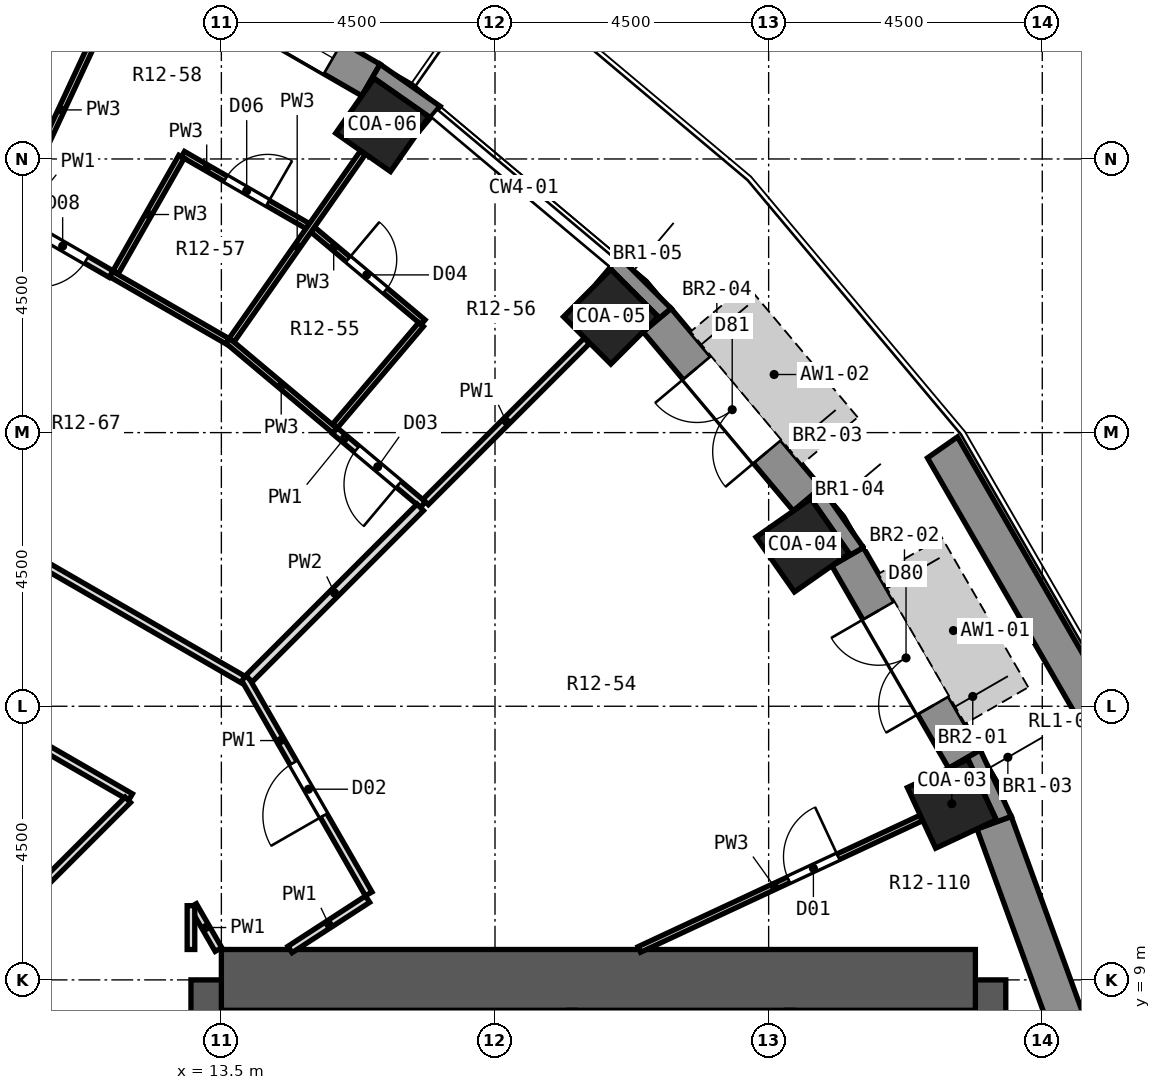
"""IFC4 building model, lengths in metres.
Left out: names, types, materials, properties, quantities, classifications, styles, units other than length and angle.
Written with IfcOpenShell. Run it as: python <this file> out.ifc"""

import sys

from ifc_helpers import new_model, si_unit, direction, frame, frame_2d, origin, origin_2d, place, context, subcontext, project, spatial, polyline, rectangle, outline, extrude, element, fill, save


model = new_model("IFC4")
c1 = context("Model", 3, precision=1e-05, world=origin(), true_north=direction((0.0, 1.0)))
c2 = subcontext(c1, "Body", "Model", "MODEL_VIEW")
j1 = project(units=[si_unit("LENGTHUNIT", "METRE"), si_unit("PLANEANGLEUNIT", "RADIAN")], contexts=[c1])
p1 = place(None, origin())
s1 = spatial("IfcSite", under=j1, at=p1, CompositionType="ELEMENT")
p2 = place(p1, origin())
s2 = spatial("IfcBuilding", under=s1, at=p2, CompositionType="ELEMENT")
p3 = place(p2, frame((0.0, 0.0, 56.0)))
s3 = spatial("IfcBuildingStorey", under=s2, at=p3, CompositionType="ELEMENT", Elevation=56.0)
for number, where, z_axis, x_axis in (
    (1, (25.512, 11.897, 0.0), (0.0, 0.0, 1.0), (0.906, 0.423, 0.0)),
    (2, (23.059, 16.146, 0.0), (0.0, 0.0, 1.0), (0.819, 0.574, 0.0)),
    (3, (19.905, 19.905, 0.0), (0.0, 0.0, 1.0), (0.707, 0.707, 0.0)),
    (4, (16.146, 23.059, 0.0), (0.0, 0.0, 1.0), (0.574, 0.819, 0.0)),
):
    element("IfcColumn", number, at=place(p3, frame(where, z_axis=z_axis, x_axis=x_axis)), inside=s3, PredefinedType="COLUMN", context=c2, shape_type="SweptSolid", body=[
        extrude(rectangle(XDim=1.1, YDim=1.1, at=origin_2d()), origin(), (0.0, 0.0, 1.0), 3.3),
    ])
p4 = place(p3, frame((13.5, -9.0, 0.0), z_axis=(0.0, 0.0, 1.0), x_axis=(0.0, 1.0, 0.0)))
e5 = element("IfcWall", 5, at=p4, inside=s3, PredefinedType="SHEAR", context=c2, shape_type="SweptSolid", body=[
    extrude(rectangle(XDim=18.0, YDim=1.0, at=frame_2d((9.0, 0.0))), origin(), (0.0, 0.0, 1.0), 3.3),
])
p5 = place(p4, frame((15.4, 0.0, 0.0)))
e6 = element("IfcOpeningElement", 6, at=p5, cuts=e5, PredefinedType="OPENING", context=c2, shape_type="SweptSolid", body=[
    extrude(rectangle(XDim=1.2, YDim=2.1, at=frame_2d((0.6, 1.05))), frame((0.0, 0.512, 0.0), z_axis=(0.0, -1.0, 0.0), x_axis=(1.0, 0.0, 0.0)), (0.0, 0.0, 1.0), 1.024),
])
p6 = place(p4, frame((1.4, 0.0, 0.0)))
e7 = element("IfcOpeningElement", 7, at=p6, cuts=e5, PredefinedType="OPENING", context=c2, shape_type="SweptSolid", body=[
    extrude(rectangle(XDim=1.2, YDim=2.1, at=frame_2d((0.6, 1.05))), frame((0.0, 0.512, 0.0), z_axis=(0.0, -1.0, 0.0), x_axis=(1.0, 0.0, 0.0)), (0.0, 0.0, 1.0), 1.024),
])
p7 = place(p4, frame((7.5, 0.0, 0.0)))
e8 = element("IfcOpeningElement", 8, at=p7, cuts=e5, PredefinedType="OPENING", context=c2, shape_type="SweptSolid", body=[
    extrude(rectangle(XDim=3.0, YDim=2.4, at=frame_2d((1.5, 1.2))), frame((0.0, 0.512, 0.0), z_axis=(0.0, -1.0, 0.0), x_axis=(1.0, 0.0, 0.0)), (0.0, 0.0, 1.0), 1.024),
])
p8 = place(p3, frame((25.9, -9.0, 0.0), z_axis=(0.0, 0.0, 1.0), x_axis=(0.0, 1.0, 0.0)))
e9 = element("IfcWall", 9, at=p8, inside=s3, PredefinedType="SHEAR", context=c2, shape_type="SweptSolid", body=[
    extrude(rectangle(XDim=18.0, YDim=1.0, at=frame_2d((9.0, 0.0))), origin(), (0.0, 0.0, 1.0), 3.3),
])
p9 = place(p3, frame((13.5, 9.0, 0.0), z_axis=(0.0, 0.0, 1.0), x_axis=(1.0, 0.0, 0.0)))
e10 = element("IfcWall", 10, at=p9, inside=s3, PredefinedType="SHEAR", context=c2, shape_type="SweptSolid", body=[
    extrude(rectangle(XDim=12.4, YDim=1.0, at=frame_2d((6.2, 0.0))), origin(), (0.0, 0.0, 1.0), 3.3),
])
p10 = place(p3, frame((27.523, 7.971, 0.0), z_axis=(0.0, 0.0, 1.0), x_axis=(-0.342028474173, 0.939689588564, 0.0)))
e11 = element("IfcWall", 11, at=p10, inside=s3, PredefinedType="SOLIDWALL", context=c2, shape_type="SweptSolid", body=[
    extrude(rectangle(XDim=3.846, YDim=0.6, at=frame_2d((1.923, 0.0))), origin(), (0.0, 0.0, 1.0), 2.75),
])
p11 = place(p3, frame((25.721, 12.63, 0.0), z_axis=(0.0, 0.0, 1.0), x_axis=(-0.499989888488, 0.86603124159, 0.0)))
e12 = element("IfcWall", 12, at=p11, inside=s3, PredefinedType="SOLIDWALL", context=c2, shape_type="SweptSolid", body=[
    extrude(rectangle(XDim=3.846, YDim=0.6, at=frame_2d((1.923, 0.0))), origin(), (0.0, 0.0, 1.0), 2.75),
])
p12 = place(p11, frame((1.023, 0.0, 0.0)))
e13 = element("IfcOpeningElement", 13, at=p12, cuts=e12, PredefinedType="OPENING", context=c2, shape_type="SweptSolid", body=[
    extrude(rectangle(XDim=1.8, YDim=2.4, at=frame_2d((0.9, 1.2))), frame((0.0, 0.312, 0.0), z_axis=(0.0, -1.0, 0.0), x_axis=(1.0, 0.0, 0.0)), (0.0, 0.0, 1.0), 0.624),
])
p13 = place(p3, frame((23.137, 16.904, 0.0), z_axis=(0.0, 0.0, 1.0), x_axis=(-0.642809392687, 0.766026164483, 0.0)))
e14 = element("IfcWall", 14, at=p13, inside=s3, PredefinedType="SOLIDWALL", context=c2, shape_type="SweptSolid", body=[
    extrude(rectangle(XDim=3.846, YDim=0.6, at=frame_2d((1.923, 0.0))), origin(), (0.0, 0.0, 1.0), 2.75),
])
p14 = place(p13, frame((1.023, 0.0, 0.0)))
e15 = element("IfcOpeningElement", 15, at=p14, cuts=e14, PredefinedType="OPENING", context=c2, shape_type="SweptSolid", body=[
    extrude(rectangle(XDim=1.8, YDim=2.4, at=frame_2d((0.9, 1.2))), frame((0.0, 0.312, 0.0), z_axis=(0.0, -1.0, 0.0), x_axis=(1.0, 0.0, 0.0)), (0.0, 0.0, 1.0), 0.624),
])
p15 = place(p3, frame((15.96, 23.798, 0.0), z_axis=(0.0, 0.0, 1.0), x_axis=(-0.86603124159, 0.499989888488, 0.0)))
e16 = element("IfcWall", 16, at=p15, inside=s3, PredefinedType="SOLIDWALL", context=c2, shape_type="SweptSolid", body=[
    extrude(rectangle(XDim=3.846, YDim=0.6, at=frame_2d((1.923, 0.0))), origin(), (0.0, 0.0, 1.0), 2.75),
])
p16 = place(p15, frame((0.723, 0.0, 0.9)))
e17 = element("IfcOpeningElement", 17, at=p16, cuts=e16, PredefinedType="OPENING", context=c2, shape_type="SweptSolid", body=[
    extrude(rectangle(XDim=2.4, YDim=1.8, at=frame_2d((1.2, 0.9))), frame((0.0, 0.312, 0.0), z_axis=(0.0, -1.0, 0.0), x_axis=(1.0, 0.0, 0.0)), (0.0, 0.0, 1.0), 0.624),
])
p17 = place(p3, origin())
e18 = element("IfcWall", 18, at=p17, inside=s3, PredefinedType="SOLIDWALL", context=c2, shape_type="SweptSolid", body=[
    extrude(outline(polyline([(25.981, 12.78), (25.461, 12.479), (25.779, 12.628), (26.243, 11.631), (25.926, 11.483), (26.49, 11.688), (25.981, 12.78)])), origin(), (0.0, 0.0, 1.0), 2.75),
])
p18 = place(p3, origin())
e19 = element("IfcWall", 19, at=p18, inside=s3, PredefinedType="SOLIDWALL", context=c2, shape_type="SweptSolid", body=[
    extrude(outline(polyline([(24.058, 16.11), (23.367, 17.097), (22.907, 16.711), (23.194, 16.912), (23.825, 16.011), (23.538, 15.81), (24.058, 16.11)])), origin(), (0.0, 0.0, 1.0), 2.75),
])
p19 = place(p3, origin())
e20 = element("IfcWall", 20, at=p19, inside=s3, PredefinedType="SOLIDWALL", context=c2, shape_type="SweptSolid", body=[
    extrude(outline(polyline([(20.043, 20.895), (19.657, 20.435), (19.905, 20.683), (20.683, 19.905), (20.435, 19.657), (20.895, 20.043), (20.043, 20.895)])), origin(), (0.0, 0.0, 1.0), 2.75),
])
p20 = place(p3, origin())
e21 = element("IfcWall", 21, at=p20, inside=s3, PredefinedType="SOLIDWALL", context=c2, shape_type="SweptSolid", body=[
    extrude(outline(polyline([(17.097, 23.367), (16.11, 24.058), (15.81, 23.538), (16.011, 23.825), (16.912, 23.194), (16.711, 22.907), (17.097, 23.367)])), origin(), (0.0, 0.0, 1.0), 2.75),
])
p21 = place(p3, origin())
e22 = element("IfcWall", 22, at=p21, inside=s3, PredefinedType="PARAPET", context=c2, shape_type="SweptSolid", body=[
    extrude(outline(polyline([(30.194, 8.09), (28.33, 13.21), (25.605, 17.929), (25.112, 17.584), (27.784, 12.956), (29.612, 7.934), (30.194, 8.09)])), origin(), (0.0, 0.0, 1.0), 0.5),
])
p22 = place(p3, frame((13.876, 13.976, 0.0), z_axis=(0.0, 0.0, 1.0), x_axis=(0.498306982451, -0.867000663921, 0.0)))
e23 = element("IfcWall", 23, at=p22, inside=s3, PredefinedType="PARTITIONING", context=c2, shape_type="SweptSolid", body=[
    extrude(rectangle(XDim=4.108, YDim=0.125, at=frame_2d((2.054, 0.0))), origin(), (0.0, 0.0, 1.0), 2.75),
])
p23 = place(p22, frame((1.623, 0.0, 0.0)))
e24 = element("IfcOpeningElement", 24, at=p23, cuts=e23, PredefinedType="OPENING", context=c2, shape_type="SweptSolid", body=[
    extrude(rectangle(XDim=1.0, YDim=2.1, at=frame_2d((0.5, 1.05))), frame((0.0, 0.074, 0.0), z_axis=(0.0, -1.0, 0.0), x_axis=(1.0, 0.0, 0.0)), (0.0, 0.0, 1.0), 0.149),
])
p24 = place(p3, frame((13.035, 10.222, 0.0), z_axis=(0.0, 0.0, 1.0), x_axis=(0.49991670217, -0.866073490468, 0.0)))
e25 = element("IfcWall", 25, at=p24, inside=s3, PredefinedType="PARTITIONING", context=c2, shape_type="SweptSolid", body=[
    extrude(rectangle(XDim=0.834, YDim=0.125, at=frame_2d((0.417, 0.0))), origin(), (0.0, 0.0, 1.0), 2.75),
])
p25 = place(p3, frame((13.601, 19.513, 0.0), z_axis=(0.0, 0.0, 1.0), x_axis=(0.765838323525, -0.643033173499, 0.0)))
e26 = element("IfcWall", 26, at=p25, inside=s3, PredefinedType="PARTITIONING", context=c2, shape_type="SweptSolid", body=[
    extrude(rectangle(XDim=2.306, YDim=0.1, at=frame_2d((1.153, 0.0))), origin(), (0.0, 0.0, 1.0), 2.75),
])
p26 = place(p3, frame((15.367, 18.03, 0.0), z_axis=(0.0, 0.0, 1.0), x_axis=(0.766035589551, -0.64279816081, 0.0)))
e27 = element("IfcWall", 27, at=p26, inside=s3, PredefinedType="PARTITIONING", context=c2, shape_type="SweptSolid", body=[
    extrude(rectangle(XDim=1.89, YDim=0.125, at=frame_2d((0.945, 0.0))), origin(), (0.0, 0.0, 1.0), 2.75),
])
p27 = place(p26, frame((0.47, 0.0, 0.0)))
e28 = element("IfcOpeningElement", 28, at=p27, cuts=e27, PredefinedType="OPENING", context=c2, shape_type="SweptSolid", body=[
    extrude(rectangle(XDim=0.9, YDim=2.1, at=frame_2d((0.45, 1.05))), frame((0.0, 0.074, 0.0), z_axis=(0.0, -1.0, 0.0), x_axis=(1.0, 0.0, 0.0)), (0.0, 0.0, 1.0), 0.149),
])
p28 = place(p3, frame((15.002, 21.339, 0.0), z_axis=(0.0, 0.0, 1.0), x_axis=(0.765995095449, -0.642846415365, 0.0)))
e29 = element("IfcWall", 29, at=p28, inside=s3, PredefinedType="PARTITIONING", context=c2, shape_type="SweptSolid", body=[
    extrude(rectangle(XDim=2.369, YDim=0.1, at=frame_2d((1.185, 0.0))), origin(), (0.0, 0.0, 1.0), 2.75),
])
p29 = place(p28, frame((0.76, 0.0, 0.0)))
e30 = element("IfcOpeningElement", 30, at=p29, cuts=e29, PredefinedType="OPENING", context=c2, shape_type="SweptSolid", body=[
    extrude(rectangle(XDim=0.8, YDim=2.1, at=frame_2d((0.4, 1.05))), frame((0.0, 0.062, 0.0), z_axis=(0.0, -1.0, 0.0), x_axis=(1.0, 0.0, 0.0)), (0.0, 0.0, 1.0), 0.124),
])
p30 = place(p3, frame((4.332, 16.436, 0.0), z_axis=(0.0, 0.0, 1.0), x_axis=(0.866073188118, -0.499917225971, 0.0)))
e31 = element("IfcWall", 31, at=p30, inside=s3, PredefinedType="PARTITIONING", context=c2, shape_type="SweptSolid", body=[
    extrude(rectangle(XDim=8.861, YDim=0.125, at=frame_2d((4.431, 0.0))), origin(), (0.0, 0.0, 1.0), 2.75),
])
p31 = place(p30, frame((4.768, 0.0, 0.0)))
e32 = element("IfcOpeningElement", 32, at=p31, cuts=e31, PredefinedType="OPENING", context=c2, shape_type="SweptSolid", body=[
    extrude(rectangle(XDim=0.9, YDim=2.1, at=frame_2d((0.45, 1.05))), frame((0.0, 0.074, 0.0), z_axis=(0.0, -1.0, 0.0), x_axis=(1.0, 0.0, 0.0)), (0.0, 0.0, 1.0), 0.149),
])
p32 = place(p3, frame((5.029, 19.036, 0.0), z_axis=(0.0, 0.0, 1.0), x_axis=(0.866024825845, -0.50000100102, 0.0)))
e33 = element("IfcWall", 33, at=p32, inside=s3, PredefinedType="PARTITIONING", context=c2, shape_type="SweptSolid", body=[
    extrude(rectangle(XDim=10.192, YDim=0.125, at=frame_2d((5.096, 0.0))), origin(), (0.0, 0.0, 1.0), 2.75),
])
p33 = place(p3, frame((11.687, 20.607, 0.0), z_axis=(0.0, 0.0, 1.0), x_axis=(0.866150561987, -0.499783156949, 0.0)))
e34 = element("IfcWall", 34, at=p33, inside=s3, PredefinedType="PARTITIONING", context=c2, shape_type="SweptSolid", body=[
    extrude(rectangle(XDim=2.205, YDim=0.1, at=frame_2d((1.103, 0.0))), origin(), (0.0, 0.0, 1.0), 2.75),
])
p34 = place(p3, frame((9.995, 21.584, 0.0), z_axis=(0.0, 0.0, 1.0), x_axis=(0.865996179119, -0.50005061519, 0.0)))
e35 = element("IfcWall", 35, at=p34, inside=s3, PredefinedType="PARTITIONING", context=c2, shape_type="SweptSolid", body=[
    extrude(rectangle(XDim=1.953, YDim=0.125, at=frame_2d((0.977, 0.0))), origin(), (0.0, 0.0, 1.0), 2.75),
])
p35 = place(p34, frame((0.583, 0.0, 0.0)))
e36 = element("IfcOpeningElement", 36, at=p35, cuts=e35, PredefinedType="OPENING", context=c2, shape_type="SweptSolid", body=[
    extrude(rectangle(XDim=0.9, YDim=2.1, at=frame_2d((0.45, 1.05))), frame((0.0, 0.074, 0.0), z_axis=(0.0, -1.0, 0.0), x_axis=(1.0, 0.0, 0.0)), (0.0, 0.0, 1.0), 0.149),
])
p36 = place(p3, frame((12.869, 22.58, 0.0), z_axis=(0.0, 0.0, 1.0), x_axis=(0.866116947413, -0.499841408252, 0.0)))
e37 = element("IfcWall", 37, at=p36, inside=s3, PredefinedType="PARTITIONING", context=c2, shape_type="SweptSolid", body=[
    extrude(rectangle(XDim=2.369, YDim=0.1, at=frame_2d((1.185, 0.0))), origin(), (0.0, 0.0, 1.0), 2.75),
])
p37 = place(p36, frame((0.809, 0.0, 0.0)))
e38 = element("IfcOpeningElement", 38, at=p37, cuts=e37, PredefinedType="OPENING", context=c2, shape_type="SweptSolid", body=[
    extrude(rectangle(XDim=0.8, YDim=2.1, at=frame_2d((0.4, 1.05))), frame((0.0, 0.062, 0.0), z_axis=(0.0, -1.0, 0.0), x_axis=(1.0, 0.0, 0.0)), (0.0, 0.0, 1.0), 0.124),
])
p38 = place(p3, frame((20.373, 9.5, 0.0), z_axis=(0.0, 0.0, 1.0), x_axis=(0.906330751784, 0.422569010187, 0.0)))
e39 = element("IfcWall", 39, at=p38, inside=s3, PredefinedType="PARTITIONING", context=c2, shape_type="SweptSolid", body=[
    extrude(rectangle(XDim=5.111, YDim=0.1, at=frame_2d((2.555, 0.0))), origin(), (0.0, 0.0, 1.0), 2.75),
])
p39 = place(p38, frame((2.709, 0.0, 0.0)))
e40 = element("IfcOpeningElement", 40, at=p39, cuts=e39, PredefinedType="OPENING", context=c2, shape_type="SweptSolid", body=[
    extrude(rectangle(XDim=0.9, YDim=2.1, at=frame_2d((0.45, 1.05))), frame((0.0, 0.062, 0.0), z_axis=(0.0, -1.0, 0.0), x_axis=(1.0, 0.0, 0.0)), (0.0, 0.0, 1.0), 0.124),
])
p40 = place(p3, frame((14.629, 9.5, 0.0), z_axis=(0.0, 0.0, 1.0), x_axis=(0.83882853689, 0.544395706908, 0.0)))
e41 = element("IfcWall", 41, at=p40, inside=s3, PredefinedType="PARTITIONING", context=c2, shape_type="SweptSolid", body=[
    extrude(rectangle(XDim=1.521, YDim=0.125, at=frame_2d((0.76, 0.0))), origin(), (0.0, 0.0, 1.0), 2.75),
])
p41 = place(p3, frame((6.783, 6.783, 0.0), z_axis=(0.0, 0.0, 1.0), x_axis=(0.707106781187, 0.707106781187, 0.0)))
e42 = element("IfcWall", 42, at=p41, inside=s3, PredefinedType="PARTITIONING", context=c2, shape_type="SweptSolid", body=[
    extrude(rectangle(XDim=7.324, YDim=0.125, at=frame_2d((3.662, 0.0))), origin(), (0.0, 0.0, 1.0), 2.75),
])
p42 = place(p3, frame((16.859, 16.859, 0.0), z_axis=(0.0, 0.0, 1.0), x_axis=(0.707106781187, 0.707106781187, 0.0)))
e43 = element("IfcWall", 43, at=p42, inside=s3, PredefinedType="PARTITIONING", context=c2, shape_type="SweptSolid", body=[
    extrude(rectangle(XDim=3.748, YDim=0.125, at=frame_2d((1.874, 0.0))), origin(), (0.0, 0.0, 1.0), 2.75),
])
p43 = place(p3, frame((13.953, 13.953, 0.0), z_axis=(0.0, 0.0, 1.0), x_axis=(0.707106781187, 0.707106781187, 0.0)))
e44 = element("IfcWall", 44, at=p43, inside=s3, PredefinedType="PARTITIONING", context=c2, shape_type="SweptSolid", body=[
    extrude(rectangle(XDim=3.985, YDim=0.15, at=frame_2d((1.992, 0.0))), origin(), (0.0, 0.0, 1.0), 2.75),
])
p44 = place(p3, frame((15.369, 18.11, 0.0), z_axis=(0.0, 0.0, 1.0), x_axis=(0.646932224045, 0.762547505072, 0.0)))
e45 = element("IfcWall", 45, at=p44, inside=s3, PredefinedType="PARTITIONING", context=c2, shape_type="SweptSolid", body=[
    extrude(rectangle(XDim=2.188, YDim=0.1, at=frame_2d((1.094, 0.0))), origin(), (0.0, 0.0, 1.0), 2.75),
])
p45 = place(p3, frame((13.669, 19.521, 0.0), z_axis=(0.0, 0.0, 1.0), x_axis=(0.573558226361, 0.81916479476, 0.0)))
e46 = element("IfcWall", 46, at=p45, inside=s3, PredefinedType="PARTITIONING", context=c2, shape_type="SweptSolid", body=[
    extrude(rectangle(XDim=3.76, YDim=0.1, at=frame_2d((1.88, 0.0))), origin(), (0.0, 0.0, 1.0), 2.75),
])
p46 = place(p3, frame((11.761, 20.636, 0.0), z_axis=(0.0, 0.0, 1.0), x_axis=(0.495213152806, 0.868771508101, 0.0)))
e47 = element("IfcWall", 47, at=p46, inside=s3, PredefinedType="PARTITIONING", context=c2, shape_type="SweptSolid", body=[
    extrude(rectangle(XDim=2.188, YDim=0.1, at=frame_2d((1.094, 0.0))), origin(), (0.0, 0.0, 1.0), 2.75),
])
p47 = place(p3, frame((10.077, 21.608, 0.0), z_axis=(0.0, 0.0, 1.0), x_axis=(0.422418199687, 0.906401050624, 0.0)))
e48 = element("IfcWall", 48, at=p47, inside=s3, PredefinedType="PARTITIONING", context=c2, shape_type="SweptSolid", body=[
    extrude(rectangle(XDim=3.748, YDim=0.1, at=frame_2d((1.874, 0.0))), origin(), (0.0, 0.0, 1.0), 2.75),
])
p48 = place(p3, frame((13.0, 9.5, 0.0), z_axis=(0.0, 0.0, 1.0), x_axis=(0.0, 1.0, 0.0)))
e49 = element("IfcWall", 49, at=p48, inside=s3, PredefinedType="PARTITIONING", context=c2, shape_type="SweptSolid", body=[
    extrude(rectangle(XDim=0.72, YDim=0.125, at=frame_2d((0.36, 0.0))), origin(), (0.0, 0.0, 1.0), 2.75),
])
for number, where, z_axis, x_axis in (
    (50, (19.27, 5.3, 0.0), (0.0, 0.0, 1.0), (0.0, 1.0, 0.0)),
    (51, (22.846, 5.3, 0.0), (0.0, 0.0, 1.0), (0.0, 1.0, 0.0)),
):
    element("IfcWall", number, at=place(p3, frame(where, z_axis=z_axis, x_axis=x_axis)), inside=s3, PredefinedType="PARTITIONING", context=c2, shape_type="SweptSolid", body=[
        extrude(rectangle(XDim=3.2, YDim=0.1, at=frame_2d((1.6, 0.0))), origin(), (0.0, 0.0, 1.0), 2.75),
    ])
p49 = place(p12, origin())
e52 = element("IfcDoor", 52, at=p49, inside=s3, OperationType="DOUBLE_DOOR_SINGLE_SWING", PredefinedType="DOOR", context=c2, shape_type="SweptSolid", body=[
    extrude(rectangle(XDim=1.8, YDim=2.4, at=frame_2d((0.9, 1.2))), frame((0.0, 0.125, 0.0), z_axis=(0.0, -1.0, 0.0), x_axis=(1.0, 0.0, 0.0)), (0.0, 0.0, 1.0), 0.05),
])
fill(e13, e52)
p50 = place(p14, origin())
e53 = element("IfcDoor", 53, at=p50, inside=s3, OperationType="DOUBLE_DOOR_SINGLE_SWING", PredefinedType="DOOR", context=c2, shape_type="SweptSolid", body=[
    extrude(rectangle(XDim=1.8, YDim=2.4, at=frame_2d((0.9, 1.2))), frame((0.0, 0.125, 0.0), z_axis=(0.0, -1.0, 0.0), x_axis=(1.0, 0.0, 0.0)), (0.0, 0.0, 1.0), 0.05),
])
fill(e15, e53)
p51 = place(p16, origin())
e54 = element("IfcWindow", 54, at=p51, inside=s3, PartitioningType="SINGLE_PANEL", PredefinedType="WINDOW", context=c2, shape_type="SweptSolid", body=[
    extrude(rectangle(XDim=2.4, YDim=1.8, at=frame_2d((1.2, 0.9))), frame((0.0, 0.18, 0.0), z_axis=(0.0, -1.0, 0.0), x_axis=(1.0, 0.0, 0.0)), (0.0, 0.0, 1.0), 0.06),
])
fill(e17, e54)
p52 = place(p39, origin())
e55 = element("IfcDoor", 55, at=p52, inside=s3, OperationType="SINGLE_SWING_RIGHT", PredefinedType="DOOR", context=c2, shape_type="SweptSolid", body=[
    extrude(rectangle(XDim=0.9, YDim=2.1, at=frame_2d((0.45, 1.05))), frame((0.0, 0.025, 0.0), z_axis=(0.0, -1.0, 0.0), x_axis=(1.0, 0.0, 0.0)), (0.0, 0.0, 1.0), 0.05),
])
fill(e40, e55)
p53 = place(p23, frame((1.0, 0.0, 0.0), z_axis=(0.0, 0.0, 1.0), x_axis=(-1.0, 0.0, 0.0)))
e56 = element("IfcDoor", 56, at=p53, inside=s3, OperationType="SINGLE_SWING_LEFT", PredefinedType="DOOR", context=c2, shape_type="SweptSolid", body=[
    extrude(rectangle(XDim=1.0, YDim=2.1, at=frame_2d((0.5, 1.05))), frame((0.0, 0.025, 0.0), z_axis=(0.0, -1.0, 0.0), x_axis=(1.0, 0.0, 0.0)), (0.0, 0.0, 1.0), 0.05),
])
fill(e24, e56)
p54 = place(p27, frame((0.9, 0.0, 0.0), z_axis=(0.0, 0.0, 1.0), x_axis=(-1.0, 0.0, 0.0)))
e57 = element("IfcDoor", 57, at=p54, inside=s3, OperationType="SINGLE_SWING_LEFT", PredefinedType="DOOR", context=c2, shape_type="SweptSolid", body=[
    extrude(rectangle(XDim=0.9, YDim=2.1, at=frame_2d((0.45, 1.05))), frame((0.0, 0.025, 0.0), z_axis=(0.0, -1.0, 0.0), x_axis=(1.0, 0.0, 0.0)), (0.0, 0.0, 1.0), 0.05),
])
fill(e28, e57)
p55 = place(p29, origin())
e58 = element("IfcDoor", 58, at=p55, inside=s3, OperationType="SINGLE_SWING_LEFT", PredefinedType="DOOR", context=c2, shape_type="SweptSolid", body=[
    extrude(rectangle(XDim=0.8, YDim=2.1, at=frame_2d((0.4, 1.05))), frame((0.0, 0.025, 0.0), z_axis=(0.0, -1.0, 0.0), x_axis=(1.0, 0.0, 0.0)), (0.0, 0.0, 1.0), 0.05),
])
fill(e30, e58)
p56 = place(p37, origin())
e59 = element("IfcDoor", 59, at=p56, inside=s3, OperationType="SINGLE_SWING_RIGHT", PredefinedType="DOOR", context=c2, shape_type="SweptSolid", body=[
    extrude(rectangle(XDim=0.8, YDim=2.1, at=frame_2d((0.4, 1.05))), frame((0.0, 0.025, 0.0), z_axis=(0.0, -1.0, 0.0), x_axis=(1.0, 0.0, 0.0)), (0.0, 0.0, 1.0), 0.05),
])
fill(e38, e59)
p57 = place(p35, frame((0.9, 0.0, 0.0), z_axis=(0.0, 0.0, 1.0), x_axis=(-1.0, 0.0, 0.0)))
e60 = element("IfcDoor", 60, at=p57, inside=s3, OperationType="SINGLE_SWING_RIGHT", PredefinedType="DOOR", context=c2, shape_type="SweptSolid", body=[
    extrude(rectangle(XDim=0.9, YDim=2.1, at=frame_2d((0.45, 1.05))), frame((0.0, 0.025, 0.0), z_axis=(0.0, -1.0, 0.0), x_axis=(1.0, 0.0, 0.0)), (0.0, 0.0, 1.0), 0.05),
])
fill(e36, e60)
save(model, sys.argv[1])
